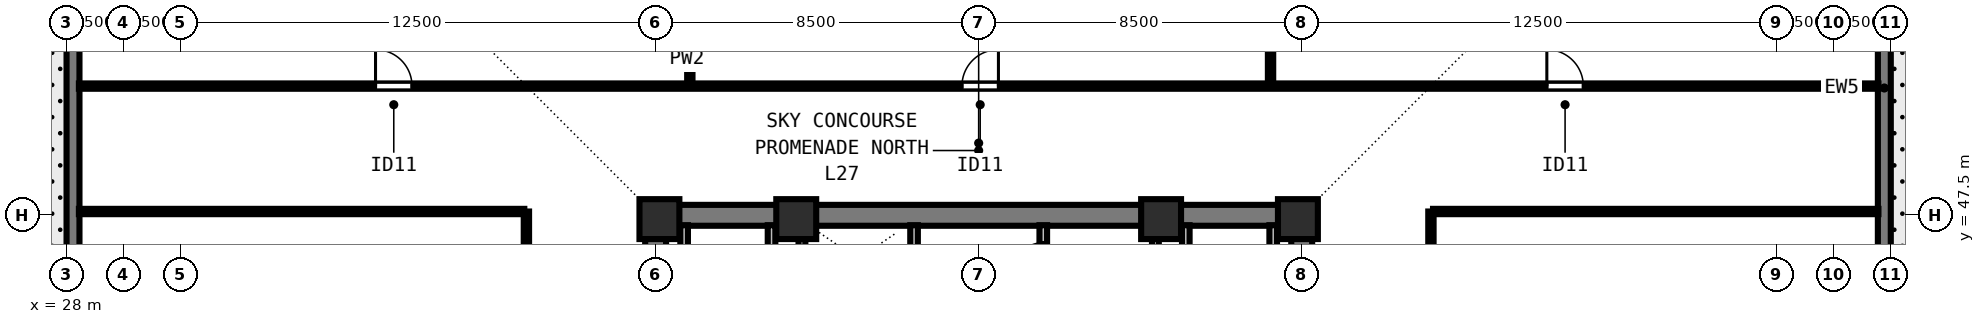
"""IFC4 building model, lengths in metres.
Left out: names, types, materials, properties, quantities, classifications, styles, units other than length and angle.
Written with IfcOpenShell. Run it as: python <this file> out.ifc"""

import sys

from ifc_helpers import new_model, si_unit, direction, frame, frame_2d, origin, origin_2d, place, context, subcontext, project, spatial, rectangle, extrude, element, fill, save


model = new_model("IFC4")
c1 = context("Model", 3, precision=1e-05, world=origin(), true_north=direction((0.0, 1.0)))
c2 = subcontext(c1, "Body", "Model", "MODEL_VIEW")
j1 = project(units=[si_unit("LENGTHUNIT", "METRE"), si_unit("PLANEANGLEUNIT", "RADIAN")], contexts=[c1])
p1 = place(None, origin())
s1 = spatial("IfcSite", under=j1, at=p1, CompositionType="ELEMENT")
p2 = place(p1, origin())
s2 = spatial("IfcBuilding", under=s1, at=p2, CompositionType="ELEMENT")
p3 = place(p2, frame((0.0, 0.0, 101.5)))
s3 = spatial("IfcBuildingStorey", under=s2, at=p3, CompositionType="ELEMENT", Elevation=101.5)
for number, where, z_axis, x_axis in (
    (1, (43.6, 47.4, 0.0), (0.0, 0.0, 1.0), (1.0, 0.0, 0.0)),
    (2, (47.2, 47.4, 0.0), (0.0, 0.0, 1.0), (1.0, 0.0, 0.0)),
    (3, (56.8, 47.4, 0.0), (0.0, 0.0, 1.0), (1.0, 0.0, 0.0)),
    (4, (60.4, 47.4, 0.0), (0.0, 0.0, 1.0), (1.0, 0.0, 0.0)),
):
    element("IfcColumn", number, at=place(p3, frame(where, z_axis=z_axis, x_axis=x_axis)), inside=s3, PredefinedType="COLUMN", context=c2, shape_type="SweptSolid", body=[
        extrude(rectangle(XDim=1.05, YDim=1.05, at=origin_2d()), origin(), (0.0, 0.0, 1.0), 4.5),
    ])
p4 = place(p3, frame((75.83, 59.0, 0.0), z_axis=(0.0, 0.0, 1.0), x_axis=(0.0, -1.0, 0.0)))
e5 = element("IfcWall", 5, at=p4, inside=s3, PredefinedType="SOLIDWALL", context=c2, shape_type="SweptSolid", body=[
    extrude(rectangle(XDim=16.3, YDim=0.34, at=frame_2d((8.15, 0.0))), origin(), (0.0, 0.0, 1.0), 4.28),
])
p5 = place(p3, frame((28.17, 42.7, 0.0), z_axis=(0.0, 0.0, 1.0), x_axis=(0.0, 1.0, 0.0)))
e6 = element("IfcWall", 6, at=p5, inside=s3, PredefinedType="SOLIDWALL", context=c2, shape_type="SweptSolid", body=[
    extrude(rectangle(XDim=15.982, YDim=0.34, at=frame_2d((7.991, 0.0))), origin(), (0.0, 0.0, 1.0), 4.28),
])
p6 = place(p3, frame((43.225, 47.5, 0.0), z_axis=(0.0, 0.0, 1.0), x_axis=(1.0, 0.0, 0.0)))
e7 = element("IfcWall", 7, at=p6, inside=s3, PredefinedType="SHEAR", context=c2, shape_type="SweptSolid", body=[
    extrude(rectangle(XDim=17.55, YDim=0.55, at=frame_2d((8.775, 0.0))), origin(), (0.0, 0.0, 1.0), 4.28),
])
for number, where, z_axis, x_axis in (
    (8, (43.5, 40.8, 0.0), (0.0, 0.0, 1.0), (0.0, 1.0, 0.0)),
    (9, (60.5, 40.8, 0.0), (0.0, 0.0, 1.0), (0.0, 1.0, 0.0)),
):
    element("IfcWall", number, at=place(p3, frame(where, z_axis=z_axis, x_axis=x_axis)), inside=s3, PredefinedType="SHEAR", context=c2, shape_type="SweptSolid", body=[
        extrude(rectangle(XDim=6.435, YDim=0.55, at=frame_2d((3.218, 0.0))), origin(), (0.0, 0.0, 1.0), 4.28),
    ])
p7 = place(p3, frame((50.3, 40.585, 0.0), z_axis=(0.0, 0.0, 1.0), x_axis=(0.0, 1.0, 0.0)))
e10 = element("IfcWall", 10, at=p7, inside=s3, PredefinedType="SOLIDWALL", context=c2, shape_type="SweptSolid", body=[
    extrude(rectangle(XDim=6.655, YDim=0.2, at=frame_2d((3.328, 0.0))), origin(), (0.0, 0.0, 1.0), 4.28),
])
p8 = place(p7, frame((0.515, 0.0, 0.0)))
e11 = element("IfcOpeningElement", 11, at=p8, cuts=e10, PredefinedType="OPENING", context=c2, shape_type="SweptSolid", body=[
    extrude(rectangle(XDim=1.1, YDim=2.2, at=frame_2d((0.55, 1.1))), frame((0.0, 0.11, 0.0), z_axis=(0.0, -1.0, 0.0), x_axis=(1.0, 0.0, 0.0)), (0.0, 0.0, 1.0), 0.22),
])
p9 = place(p7, frame((3.015, 0.0, 0.0)))
e12 = element("IfcOpeningElement", 12, at=p9, cuts=e10, PredefinedType="OPENING", context=c2, shape_type="SweptSolid", body=[
    extrude(rectangle(XDim=1.1, YDim=2.2, at=frame_2d((0.55, 1.1))), frame((0.0, 0.11, 0.0), z_axis=(0.0, -1.0, 0.0), x_axis=(1.0, 0.0, 0.0)), (0.0, 0.0, 1.0), 0.22),
])
p10 = place(p7, frame((5.065, 0.0, 0.0)))
e13 = element("IfcOpeningElement", 13, at=p10, cuts=e10, PredefinedType="OPENING", context=c2, shape_type="SweptSolid", body=[
    extrude(rectangle(XDim=0.8, YDim=2.08, at=frame_2d((0.4, 1.04))), frame((0.0, 0.11, 0.0), z_axis=(0.0, -1.0, 0.0), x_axis=(1.0, 0.0, 0.0)), (0.0, 0.0, 1.0), 0.22),
])
p11 = place(p3, frame((53.7, 40.585, 0.0), z_axis=(0.0, 0.0, 1.0), x_axis=(0.0, 1.0, 0.0)))
e14 = element("IfcWall", 14, at=p11, inside=s3, PredefinedType="SOLIDWALL", context=c2, shape_type="SweptSolid", body=[
    extrude(rectangle(XDim=6.655, YDim=0.2, at=frame_2d((3.328, 0.0))), origin(), (0.0, 0.0, 1.0), 4.28),
])
p12 = place(p11, frame((0.195, 0.0, 0.0)))
e15 = element("IfcOpeningElement", 15, at=p12, cuts=e14, PredefinedType="OPENING", context=c2, shape_type="SweptSolid", body=[
    extrude(rectangle(XDim=0.8, YDim=2.08, at=frame_2d((0.4, 1.04))), frame((0.0, 0.11, 0.0), z_axis=(0.0, -1.0, 0.0), x_axis=(1.0, 0.0, 0.0)), (0.0, 0.0, 1.0), 0.22),
])
p13 = place(p11, frame((1.865, 0.0, 0.0)))
e16 = element("IfcOpeningElement", 16, at=p13, cuts=e14, PredefinedType="OPENING", context=c2, shape_type="SweptSolid", body=[
    extrude(rectangle(XDim=1.1, YDim=2.2, at=frame_2d((0.55, 1.1))), frame((0.0, 0.11, 0.0), z_axis=(0.0, -1.0, 0.0), x_axis=(1.0, 0.0, 0.0)), (0.0, 0.0, 1.0), 0.22),
])
p14 = place(p11, frame((3.735, 0.0, 0.0)))
e17 = element("IfcOpeningElement", 17, at=p14, cuts=e14, PredefinedType="OPENING", context=c2, shape_type="SweptSolid", body=[
    extrude(rectangle(XDim=0.9, YDim=2.12, at=frame_2d((0.45, 1.06))), frame((0.0, 0.11, 0.0), z_axis=(0.0, -1.0, 0.0), x_axis=(1.0, 0.0, 0.0)), (0.0, 0.0, 1.0), 0.22),
])
p15 = place(p11, frame((5.395, 0.0, 0.0)))
e18 = element("IfcOpeningElement", 18, at=p15, cuts=e14, PredefinedType="OPENING", context=c2, shape_type="SweptSolid", body=[
    extrude(rectangle(XDim=0.8, YDim=2.1, at=frame_2d((0.4, 1.05))), frame((0.0, 0.11, 0.0), z_axis=(0.0, -1.0, 0.0), x_axis=(1.0, 0.0, 0.0)), (0.0, 0.0, 1.0), 0.22),
])
for number, where, z_axis, x_axis in (
    (19, (46.55, 43.735, 0.0), (0.0, 0.0, 1.0), (0.0, 1.0, 0.0)),
    (20, (44.25, 43.735, 0.0), (0.0, 0.0, 1.0), (0.0, 1.0, 0.0)),
    (21, (57.45, 43.735, 0.0), (0.0, 0.0, 1.0), (0.0, 1.0, 0.0)),
    (22, (59.75, 43.735, 0.0), (0.0, 0.0, 1.0), (0.0, 1.0, 0.0)),
):
    element("IfcWall", number, at=place(p3, frame(where, z_axis=z_axis, x_axis=x_axis)), inside=s3, PredefinedType="SOLIDWALL", context=c2, shape_type="SweptSolid", body=[
        extrude(rectangle(XDim=3.505, YDim=0.2, at=frame_2d((1.752, 0.0))), origin(), (0.0, 0.0, 1.0), 4.28),
    ])
for number, where, z_axis, x_axis in (
    (23, (47.35, 43.735, 0.0), (0.0, 0.0, 1.0), (0.0, 1.0, 0.0)),
    (24, (56.65, 43.735, 0.0), (0.0, 0.0, 1.0), (0.0, 1.0, 0.0)),
):
    element("IfcWall", number, at=place(p3, frame(where, z_axis=z_axis, x_axis=x_axis)), inside=s3, PredefinedType="SOLIDWALL", context=c2, shape_type="SweptSolid", body=[
        extrude(rectangle(XDim=3.505, YDim=0.18, at=frame_2d((1.752, 0.0))), origin(), (0.0, 0.0, 1.0), 4.28),
    ])
p16 = place(p3, frame((28.325, 50.9, 0.0), z_axis=(0.0, 0.0, 1.0), x_axis=(1.0, 0.0, 0.0)))
e25 = element("IfcWall", 25, at=p16, inside=s3, PredefinedType="PARTITIONING", context=c2, shape_type="SweptSolid", body=[
    extrude(rectangle(XDim=47.35, YDim=0.14, at=frame_2d((23.675, 0.0))), origin(), (0.0, 0.0, 1.0), 3.896),
])
p17 = place(p16, frame((7.805, 0.0, 0.0)))
e26 = element("IfcOpeningElement", 26, at=p17, cuts=e25, PredefinedType="OPENING", context=c2, shape_type="SweptSolid", body=[
    extrude(rectangle(XDim=0.96, YDim=2.12, at=frame_2d((0.48, 1.06))), frame((0.0, 0.08, 0.0), z_axis=(0.0, -1.0, 0.0), x_axis=(1.0, 0.0, 0.0)), (0.0, 0.0, 1.0), 0.16),
])
p18 = place(p16, frame((23.235, 0.0, 0.0)))
e27 = element("IfcOpeningElement", 27, at=p18, cuts=e25, PredefinedType="OPENING", context=c2, shape_type="SweptSolid", body=[
    extrude(rectangle(XDim=0.96, YDim=2.12, at=frame_2d((0.48, 1.06))), frame((0.0, 0.08, 0.0), z_axis=(0.0, -1.0, 0.0), x_axis=(1.0, 0.0, 0.0)), (0.0, 0.0, 1.0), 0.16),
])
p19 = place(p16, frame((38.625, 0.0, 0.0)))
e28 = element("IfcOpeningElement", 28, at=p19, cuts=e25, PredefinedType="OPENING", context=c2, shape_type="SweptSolid", body=[
    extrude(rectangle(XDim=0.96, YDim=2.12, at=frame_2d((0.48, 1.06))), frame((0.0, 0.08, 0.0), z_axis=(0.0, -1.0, 0.0), x_axis=(1.0, 0.0, 0.0)), (0.0, 0.0, 1.0), 0.16),
])
p20 = place(p3, frame((40.1, 30.4, 0.0), z_axis=(0.0, 0.0, 1.0), x_axis=(0.0, 1.0, 0.0)))
e29 = element("IfcWall", 29, at=p20, inside=s3, PredefinedType="PARTITIONING", context=c2, shape_type="SweptSolid", body=[
    extrude(rectangle(XDim=17.2, YDim=0.14, at=frame_2d((8.6, 0.0))), origin(), (0.0, 0.0, 1.0), 4.28),
])
p21 = place(p20, frame((3.772, 0.0, 0.0)))
e30 = element("IfcOpeningElement", 30, at=p21, cuts=e29, PredefinedType="OPENING", context=c2, shape_type="SweptSolid", body=[
    extrude(rectangle(XDim=0.96, YDim=2.12, at=frame_2d((0.48, 1.06))), frame((0.0, 0.08, 0.0), z_axis=(0.0, -1.0, 0.0), x_axis=(1.0, 0.0, 0.0)), (0.0, 0.0, 1.0), 0.16),
])
p22 = place(p20, frame((12.272, 0.0, 0.0)))
e31 = element("IfcOpeningElement", 31, at=p22, cuts=e29, PredefinedType="OPENING", context=c2, shape_type="SweptSolid", body=[
    extrude(rectangle(XDim=0.96, YDim=2.12, at=frame_2d((0.48, 1.06))), frame((0.0, 0.08, 0.0), z_axis=(0.0, -1.0, 0.0), x_axis=(1.0, 0.0, 0.0)), (0.0, 0.0, 1.0), 0.16),
])
p23 = place(p3, frame((63.9, 30.4, 0.0), z_axis=(0.0, 0.0, 1.0), x_axis=(0.0, 1.0, 0.0)))
e32 = element("IfcWall", 32, at=p23, inside=s3, PredefinedType="PARTITIONING", context=c2, shape_type="SweptSolid", body=[
    extrude(rectangle(XDim=17.2, YDim=0.14, at=frame_2d((8.6, 0.0))), origin(), (0.0, 0.0, 1.0), 4.28),
])
p24 = place(p23, frame((3.968, 0.0, 0.0)))
e33 = element("IfcOpeningElement", 33, at=p24, cuts=e32, PredefinedType="OPENING", context=c2, shape_type="SweptSolid", body=[
    extrude(rectangle(XDim=0.96, YDim=2.12, at=frame_2d((0.48, 1.06))), frame((0.0, 0.08, 0.0), z_axis=(0.0, -1.0, 0.0), x_axis=(1.0, 0.0, 0.0)), (0.0, 0.0, 1.0), 0.16),
])
p25 = place(p23, frame((12.468, 0.0, 0.0)))
e34 = element("IfcOpeningElement", 34, at=p25, cuts=e32, PredefinedType="OPENING", context=c2, shape_type="SweptSolid", body=[
    extrude(rectangle(XDim=0.96, YDim=2.12, at=frame_2d((0.48, 1.06))), frame((0.0, 0.08, 0.0), z_axis=(0.0, -1.0, 0.0), x_axis=(1.0, 0.0, 0.0)), (0.0, 0.0, 1.0), 0.16),
])
for number, where, z_axis, x_axis in (
    (35, (28.325, 47.6, 0.0), (0.0, 0.0, 1.0), (1.0, 0.0, 0.0)),
    (36, (63.955, 47.6, 0.0), (0.0, 0.0, 1.0), (1.0, 0.0, 0.0)),
):
    element("IfcWall", number, at=place(p3, frame(where, z_axis=z_axis, x_axis=x_axis)), inside=s3, PredefinedType="PARTITIONING", context=c2, shape_type="SweptSolid", body=[
        extrude(rectangle(XDim=11.72, YDim=0.14, at=frame_2d((5.86, 0.0))), origin(), (0.0, 0.0, 1.0), 4.28),
    ])
for number, where, z_axis, x_axis in (
    (37, (44.4, 51.0, 0.0), (0.0, 0.0, 1.0), (0.0, 1.0, 0.0)),
    (38, (59.68, 51.0, 0.0), (0.0, 0.0, 1.0), (0.0, 1.0, 0.0)),
):
    element("IfcWall", number, at=place(p3, frame(where, z_axis=z_axis, x_axis=x_axis)), inside=s3, PredefinedType="PARTITIONING", context=c2, shape_type="SweptSolid", body=[
        extrude(rectangle(XDim=11.675, YDim=0.14, at=frame_2d((5.837, 0.0))), origin(), (0.0, 0.0, 1.0), 4.28),
    ])
p26 = place(p15, origin())
e39 = element("IfcDoor", 39, at=p26, inside=s3, OperationType="SINGLE_SWING_LEFT", PredefinedType="DOOR", context=c2, shape_type="SweptSolid", body=[
    extrude(rectangle(XDim=0.8, YDim=2.1, at=frame_2d((0.4, 1.05))), frame((0.0, 0.025, 0.0), z_axis=(0.0, -1.0, 0.0), x_axis=(1.0, 0.0, 0.0)), (0.0, 0.0, 1.0), 0.05),
])
fill(e18, e39)
p27 = place(p17, origin())
e40 = element("IfcDoor", 40, at=p27, inside=s3, OperationType="SINGLE_SWING_LEFT", PredefinedType="DOOR", context=c2, shape_type="SweptSolid", body=[
    extrude(rectangle(XDim=0.96, YDim=2.12, at=frame_2d((0.48, 1.06))), frame((0.0, 0.025, 0.0), z_axis=(0.0, -1.0, 0.0), x_axis=(1.0, 0.0, 0.0)), (0.0, 0.0, 1.0), 0.05),
])
fill(e26, e40)
p28 = place(p18, origin())
e41 = element("IfcDoor", 41, at=p28, inside=s3, OperationType="SINGLE_SWING_RIGHT", PredefinedType="DOOR", context=c2, shape_type="SweptSolid", body=[
    extrude(rectangle(XDim=0.96, YDim=2.12, at=frame_2d((0.48, 1.06))), frame((0.0, 0.025, 0.0), z_axis=(0.0, -1.0, 0.0), x_axis=(1.0, 0.0, 0.0)), (0.0, 0.0, 1.0), 0.05),
])
fill(e27, e41)
p29 = place(p19, origin())
e42 = element("IfcDoor", 42, at=p29, inside=s3, OperationType="SINGLE_SWING_LEFT", PredefinedType="DOOR", context=c2, shape_type="SweptSolid", body=[
    extrude(rectangle(XDim=0.96, YDim=2.12, at=frame_2d((0.48, 1.06))), frame((0.0, 0.025, 0.0), z_axis=(0.0, -1.0, 0.0), x_axis=(1.0, 0.0, 0.0)), (0.0, 0.0, 1.0), 0.05),
])
fill(e28, e42)
save(model, sys.argv[1])
